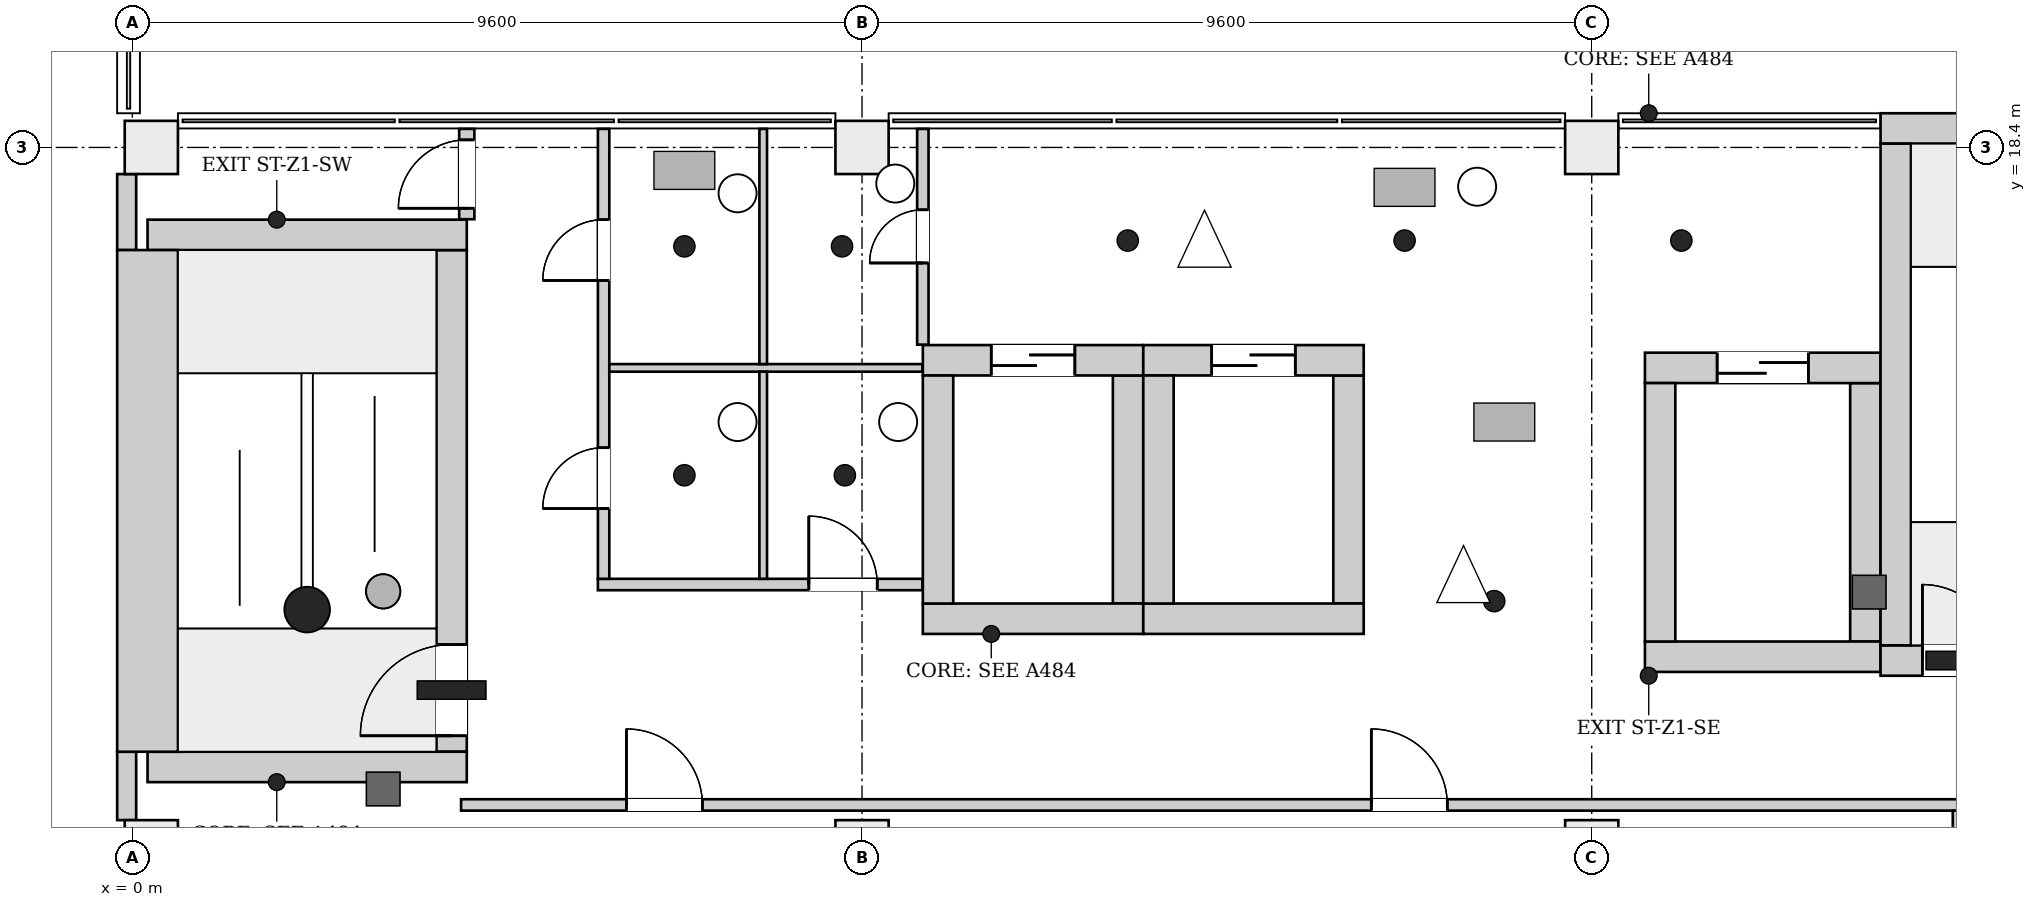
"""IFC4 building model, lengths in metres.
Left out: names, types, materials, properties, quantities, classifications, styles, units other than length and angle.
Written with IfcOpenShell. Run it as: python <this file> out.ifc"""

import sys

from ifc_helpers import new_model, si_unit, direction, frame, frame_2d, origin, origin_2d, place, context, subcontext, project, spatial, rectangle, extrude, element, fill, save


model = new_model("IFC4")
c1 = context("Model", 3, precision=1e-05, world=origin(), true_north=direction((0.0, 1.0)))
c2 = subcontext(c1, "Body", "Model", "MODEL_VIEW")
j1 = project(units=[si_unit("LENGTHUNIT", "METRE"), si_unit("PLANEANGLEUNIT", "RADIAN")], contexts=[c1])
p1 = place(None, origin())
s1 = spatial("IfcSite", under=j1, at=p1, CompositionType="ELEMENT")
p2 = place(p1, origin())
s2 = spatial("IfcBuilding", under=s1, at=p2, CompositionType="ELEMENT")
p3 = place(p2, frame((0.0, 0.0, 69.7)))
s3 = spatial("IfcBuildingStorey", under=s2, at=p3, CompositionType="ELEMENT", Elevation=69.7)
for number, where, z_axis, x_axis in (
    (1, (0.2, 10.25, 0.0), (0.0, 0.0, 1.0), (1.0, 0.0, 0.0)),
    (2, (0.2, 17.25, 0.0), (0.0, 0.0, 1.0), (1.0, 0.0, 0.0)),
):
    element("IfcWall", number, at=place(p3, frame(where, z_axis=z_axis, x_axis=x_axis)), inside=s3, PredefinedType="SHEAR", context=c2, shape_type="SweptSolid", body=[
        extrude(rectangle(XDim=4.2, YDim=0.4, at=frame_2d((2.1, 0.0))), origin(), (0.0, 0.0, 1.0), 4.2),
    ])
p4 = place(p3, frame((0.2, 10.45, 0.0), z_axis=(0.0, 0.0, 1.0), x_axis=(0.0, 1.0, 0.0)))
e3 = element("IfcWall", 3, at=p4, inside=s3, PredefinedType="SHEAR", context=c2, shape_type="SweptSolid", body=[
    extrude(rectangle(XDim=6.6, YDim=0.8, at=frame_2d((3.3, 0.0))), origin(), (0.0, 0.0, 1.0), 4.2),
])
p5 = place(p3, frame((4.2, 10.45, 0.0), z_axis=(0.0, 0.0, 1.0), x_axis=(0.0, 1.0, 0.0)))
e4 = element("IfcWall", 4, at=p5, inside=s3, PredefinedType="SHEAR", context=c2, shape_type="SweptSolid", body=[
    extrude(rectangle(XDim=6.6, YDim=0.4, at=frame_2d((3.3, 0.0))), origin(), (0.0, 0.0, 1.0), 4.2),
])
p6 = place(p5, frame((0.21, 0.0, 0.0)))
e5 = element("IfcOpeningElement", 5, at=p6, cuts=e4, PredefinedType="OPENING", context=c2, shape_type="SweptSolid", body=[
    extrude(rectangle(XDim=1.2, YDim=2.1, at=frame_2d((0.6, 1.05))), frame((0.0, 0.21, 0.0), z_axis=(0.0, -1.0, 0.0), x_axis=(1.0, 0.0, 0.0)), (0.0, 0.0, 1.0), 0.42),
])
p7 = place(p3, frame((23.0, 11.65, 0.0), z_axis=(0.0, 0.0, 1.0), x_axis=(1.0, 0.0, 0.0)))
e6 = element("IfcWall", 6, at=p7, inside=s3, PredefinedType="SHEAR", context=c2, shape_type="SweptSolid", body=[
    extrude(rectangle(XDim=4.2, YDim=0.4, at=frame_2d((2.1, 0.0))), origin(), (0.0, 0.0, 1.0), 4.2),
])
p8 = place(p7, frame((0.55, 0.0, 0.0)))
e7 = element("IfcOpeningElement", 7, at=p8, cuts=e6, PredefinedType="OPENING", context=c2, shape_type="SweptSolid", body=[
    extrude(rectangle(XDim=1.0, YDim=2.1, at=frame_2d((0.5, 1.05))), frame((0.0, 0.21, 0.0), z_axis=(0.0, -1.0, 0.0), x_axis=(1.0, 0.0, 0.0)), (0.0, 0.0, 1.0), 0.42),
])
p9 = place(p7, frame((2.65, 0.0, 0.0)))
e8 = element("IfcOpeningElement", 8, at=p9, cuts=e6, PredefinedType="OPENING", context=c2, shape_type="SweptSolid", body=[
    extrude(rectangle(XDim=1.0, YDim=2.1, at=frame_2d((0.5, 1.05))), frame((0.0, 0.21, 0.0), z_axis=(0.0, -1.0, 0.0), x_axis=(1.0, 0.0, 0.0)), (0.0, 0.0, 1.0), 0.42),
])
p10 = place(p3, frame((23.0, 18.65, 0.0), z_axis=(0.0, 0.0, 1.0), x_axis=(1.0, 0.0, 0.0)))
e9 = element("IfcWall", 9, at=p10, inside=s3, PredefinedType="SHEAR", context=c2, shape_type="SweptSolid", body=[
    extrude(rectangle(XDim=4.2, YDim=0.4, at=frame_2d((2.1, 0.0))), origin(), (0.0, 0.0, 1.0), 4.2),
])
p11 = place(p3, frame((23.2, 11.85, 0.0), z_axis=(0.0, 0.0, 1.0), x_axis=(0.0, 1.0, 0.0)))
e10 = element("IfcWall", 10, at=p11, inside=s3, PredefinedType="SHEAR", context=c2, shape_type="SweptSolid", body=[
    extrude(rectangle(XDim=6.6, YDim=0.4, at=frame_2d((3.3, 0.0))), origin(), (0.0, 0.0, 1.0), 4.2),
])
p12 = place(p3, frame((10.4, 12.2, 0.0), z_axis=(0.0, 0.0, 1.0), x_axis=(1.0, 0.0, 0.0)))
e11 = element("IfcWall", 11, at=p12, inside=s3, PredefinedType="SHEAR", context=c2, shape_type="SweptSolid", body=[
    extrude(rectangle(XDim=2.9, YDim=0.4, at=frame_2d((1.45, 0.0))), origin(), (0.0, 0.0, 1.0), 4.2),
])
p13 = place(p3, frame((10.4, 15.6, 0.0), z_axis=(0.0, 0.0, 1.0), x_axis=(1.0, 0.0, 0.0)))
e12 = element("IfcWall", 12, at=p13, inside=s3, PredefinedType="SHEAR", context=c2, shape_type="SweptSolid", body=[
    extrude(rectangle(XDim=2.9, YDim=0.4, at=frame_2d((1.45, 0.0))), origin(), (0.0, 0.0, 1.0), 4.2),
])
p14 = place(p13, frame((0.9, 0.0, 0.0)))
e13 = element("IfcOpeningElement", 13, at=p14, cuts=e12, PredefinedType="OPENING", context=c2, shape_type="SweptSolid", body=[
    extrude(rectangle(XDim=1.1, YDim=2.1, at=frame_2d((0.55, 1.05))), frame((0.0, 0.21, 0.0), z_axis=(0.0, -1.0, 0.0), x_axis=(1.0, 0.0, 0.0)), (0.0, 0.0, 1.0), 0.42),
])
for number, where, z_axis, x_axis in (
    (14, (10.6, 12.4, 0.0), (0.0, 0.0, 1.0), (0.0, 1.0, 0.0)),
    (15, (13.1, 12.4, 0.0), (0.0, 0.0, 1.0), (0.0, 1.0, 0.0)),
):
    element("IfcWall", number, at=place(p3, frame(where, z_axis=z_axis, x_axis=x_axis)), inside=s3, PredefinedType="SHEAR", context=c2, shape_type="SweptSolid", body=[
        extrude(rectangle(XDim=3.0, YDim=0.4, at=frame_2d((1.5, 0.0))), origin(), (0.0, 0.0, 1.0), 4.2),
    ])
p15 = place(p3, frame((13.3, 12.2, 0.0), z_axis=(0.0, 0.0, 1.0), x_axis=(1.0, 0.0, 0.0)))
e16 = element("IfcWall", 16, at=p15, inside=s3, PredefinedType="SHEAR", context=c2, shape_type="SweptSolid", body=[
    extrude(rectangle(XDim=2.9, YDim=0.4, at=frame_2d((1.45, 0.0))), origin(), (0.0, 0.0, 1.0), 4.2),
])
p16 = place(p3, frame((13.3, 15.6, 0.0), z_axis=(0.0, 0.0, 1.0), x_axis=(1.0, 0.0, 0.0)))
e17 = element("IfcWall", 17, at=p16, inside=s3, PredefinedType="SHEAR", context=c2, shape_type="SweptSolid", body=[
    extrude(rectangle(XDim=2.9, YDim=0.4, at=frame_2d((1.45, 0.0))), origin(), (0.0, 0.0, 1.0), 4.2),
])
p17 = place(p16, frame((0.9, 0.0, 0.0)))
e18 = element("IfcOpeningElement", 18, at=p17, cuts=e17, PredefinedType="OPENING", context=c2, shape_type="SweptSolid", body=[
    extrude(rectangle(XDim=1.1, YDim=2.1, at=frame_2d((0.55, 1.05))), frame((0.0, 0.21, 0.0), z_axis=(0.0, -1.0, 0.0), x_axis=(1.0, 0.0, 0.0)), (0.0, 0.0, 1.0), 0.42),
])
for number, where, z_axis, x_axis in (
    (19, (13.5, 12.4, 0.0), (0.0, 0.0, 1.0), (0.0, 1.0, 0.0)),
    (20, (16.0, 12.4, 0.0), (0.0, 0.0, 1.0), (0.0, 1.0, 0.0)),
):
    element("IfcWall", number, at=place(p3, frame(where, z_axis=z_axis, x_axis=x_axis)), inside=s3, PredefinedType="SHEAR", context=c2, shape_type="SweptSolid", body=[
        extrude(rectangle(XDim=3.0, YDim=0.4, at=frame_2d((1.5, 0.0))), origin(), (0.0, 0.0, 1.0), 4.2),
    ])
p18 = place(p3, frame((19.9, 11.7, 0.0), z_axis=(0.0, 0.0, 1.0), x_axis=(1.0, 0.0, 0.0)))
e21 = element("IfcWall", 21, at=p18, inside=s3, PredefinedType="SHEAR", context=c2, shape_type="SweptSolid", body=[
    extrude(rectangle(XDim=3.1, YDim=0.4, at=frame_2d((1.55, 0.0))), origin(), (0.0, 0.0, 1.0), 4.2),
])
p19 = place(p3, frame((19.9, 15.5, 0.0), z_axis=(0.0, 0.0, 1.0), x_axis=(1.0, 0.0, 0.0)))
e22 = element("IfcWall", 22, at=p19, inside=s3, PredefinedType="SHEAR", context=c2, shape_type="SweptSolid", body=[
    extrude(rectangle(XDim=3.1, YDim=0.4, at=frame_2d((1.55, 0.0))), origin(), (0.0, 0.0, 1.0), 4.2),
])
p20 = place(p19, frame((0.95, 0.0, 0.0)))
e23 = element("IfcOpeningElement", 23, at=p20, cuts=e22, PredefinedType="OPENING", context=c2, shape_type="SweptSolid", body=[
    extrude(rectangle(XDim=1.2, YDim=2.1, at=frame_2d((0.6, 1.05))), frame((0.0, 0.21, 0.0), z_axis=(0.0, -1.0, 0.0), x_axis=(1.0, 0.0, 0.0)), (0.0, 0.0, 1.0), 0.42),
])
for number, where, z_axis, x_axis in (
    (24, (20.1, 11.9, 0.0), (0.0, 0.0, 1.0), (0.0, 1.0, 0.0)),
    (25, (22.8, 11.9, 0.0), (0.0, 0.0, 1.0), (0.0, 1.0, 0.0)),
):
    element("IfcWall", number, at=place(p3, frame(where, z_axis=z_axis, x_axis=x_axis)), inside=s3, PredefinedType="SHEAR", context=c2, shape_type="SweptSolid", body=[
        extrude(rectangle(XDim=3.4, YDim=0.4, at=frame_2d((1.7, 0.0))), origin(), (0.0, 0.0, 1.0), 4.2),
    ])
for number, where, z_axis, x_axis in (
    (26, (0.25, 9.2, 0.0), (0.0, 0.0, 1.0), (1.0, 0.0, 0.0)),
    (27, (9.6, 9.2, 0.0), (0.0, 0.0, 1.0), (1.0, 0.0, 0.0)),
    (28, (19.2, 9.2, 0.0), (0.0, 0.0, 1.0), (1.0, 0.0, 0.0)),
    (29, (0.25, 18.4, 0.0), (0.0, 0.0, 1.0), (1.0, 0.0, 0.0)),
    (30, (9.6, 18.4, 0.0), (0.0, 0.0, 1.0), (1.0, 0.0, 0.0)),
    (31, (19.2, 18.4, 0.0), (0.0, 0.0, 1.0), (1.0, 0.0, 0.0)),
):
    element("IfcColumn", number, at=place(p3, frame(where, z_axis=z_axis, x_axis=x_axis)), inside=s3, PredefinedType="COLUMN", context=c2, shape_type="SweptSolid", body=[
        extrude(rectangle(XDim=0.7, YDim=0.7, at=origin_2d()), origin(), (0.0, 0.0, 1.0), 4.2),
    ])
p21 = place(p3, frame((-0.074, 10.45, 0.0), z_axis=(0.0, 0.0, 1.0), x_axis=(0.0, -1.0, 0.0)))
e32 = element("IfcWall", 32, at=p21, inside=s3, PredefinedType="ELEMENTEDWALL", context=c2, shape_type="SweptSolid", body=[
    extrude(rectangle(XDim=0.9, YDim=0.25, at=frame_2d((0.45, 0.0))), origin(), (0.0, 0.0, 1.0), 3.9),
])
p22 = place(p3, frame((-0.074, 18.05, 0.0), z_axis=(0.0, 0.0, 1.0), x_axis=(0.0, -1.0, 0.0)))
e33 = element("IfcWall", 33, at=p22, inside=s3, PredefinedType="ELEMENTEDWALL", context=c2, shape_type="SweptSolid", body=[
    extrude(rectangle(XDim=1.0, YDim=0.25, at=frame_2d((0.5, 0.0))), origin(), (0.0, 0.0, 1.0), 3.9),
])
p23 = place(p3, frame((4.4, 17.456, 0.0), z_axis=(0.0, 0.0, 1.0), x_axis=(0.0, 1.0, 0.0)))
e34 = element("IfcWall", 34, at=p23, inside=s3, PredefinedType="PARTITIONING", context=c2, shape_type="SweptSolid", body=[
    extrude(rectangle(XDim=1.188, YDim=0.2, at=frame_2d((0.594, 0.0))), origin(), (0.0, 0.0, 1.0), 3.9),
])
p24 = place(p23, frame((0.144, 0.0, 0.0)))
e35 = element("IfcOpeningElement", 35, at=p24, cuts=e34, PredefinedType="OPENING", context=c2, shape_type="SweptSolid", body=[
    extrude(rectangle(XDim=0.9, YDim=2.1, at=frame_2d((0.45, 1.05))), frame((0.0, 0.11, 0.0), z_axis=(0.0, -1.0, 0.0), x_axis=(1.0, 0.0, 0.0)), (0.0, 0.0, 1.0), 0.22),
])
p25 = place(p3, frame((4.325, 9.75, 0.0), z_axis=(0.0, 0.0, 1.0), x_axis=(1.0, 0.0, 0.0)))
e36 = element("IfcWall", 36, at=p25, inside=s3, PredefinedType="PARTITIONING", context=c2, shape_type="SweptSolid", body=[
    extrude(rectangle(XDim=34.369, YDim=0.15, at=frame_2d((17.185, 0.0))), origin(), (0.0, 0.0, 1.0), 3.9),
])
p26 = place(p25, frame((2.175, 0.0, 0.0)))
e37 = element("IfcOpeningElement", 37, at=p26, cuts=e36, PredefinedType="OPENING", context=c2, shape_type="SweptSolid", body=[
    extrude(rectangle(XDim=1.0, YDim=2.1, at=frame_2d((0.5, 1.05))), frame((0.0, 0.085, 0.0), z_axis=(0.0, -1.0, 0.0), x_axis=(1.0, 0.0, 0.0)), (0.0, 0.0, 1.0), 0.17),
])
p27 = place(p25, frame((11.975, 0.0, 0.0)))
e38 = element("IfcOpeningElement", 38, at=p27, cuts=e36, PredefinedType="OPENING", context=c2, shape_type="SweptSolid", body=[
    extrude(rectangle(XDim=1.0, YDim=2.1, at=frame_2d((0.5, 1.05))), frame((0.0, 0.085, 0.0), z_axis=(0.0, -1.0, 0.0), x_axis=(1.0, 0.0, 0.0)), (0.0, 0.0, 1.0), 0.17),
])
p28 = place(p25, frame((21.575, 0.0, 0.0)))
e39 = element("IfcOpeningElement", 39, at=p28, cuts=e36, PredefinedType="OPENING", context=c2, shape_type="SweptSolid", body=[
    extrude(rectangle(XDim=1.0, YDim=2.1, at=frame_2d((0.5, 1.05))), frame((0.0, 0.085, 0.0), z_axis=(0.0, -1.0, 0.0), x_axis=(1.0, 0.0, 0.0)), (0.0, 0.0, 1.0), 0.17),
])
p29 = place(p25, frame((28.925, 0.0, 0.0)))
e40 = element("IfcOpeningElement", 40, at=p29, cuts=e36, PredefinedType="OPENING", context=c2, shape_type="SweptSolid", body=[
    extrude(rectangle(XDim=1.0, YDim=2.1, at=frame_2d((0.5, 1.05))), frame((0.0, 0.085, 0.0), z_axis=(0.0, -1.0, 0.0), x_axis=(1.0, 0.0, 0.0)), (0.0, 0.0, 1.0), 0.17),
])
p30 = place(p3, frame((6.125, 12.65, 0.0), z_axis=(0.0, 0.0, 1.0), x_axis=(1.0, 0.0, 0.0)))
e41 = element("IfcWall", 41, at=p30, inside=s3, PredefinedType="PARTITIONING", context=c2, shape_type="SweptSolid", body=[
    extrude(rectangle(XDim=4.269, YDim=0.15, at=frame_2d((2.135, 0.0))), origin(), (0.0, 0.0, 1.0), 3.9),
])
p31 = place(p30, frame((2.775, 0.0, 0.0)))
e42 = element("IfcOpeningElement", 42, at=p31, cuts=e41, PredefinedType="OPENING", context=c2, shape_type="SweptSolid", body=[
    extrude(rectangle(XDim=0.9, YDim=2.1, at=frame_2d((0.45, 1.05))), frame((0.0, 0.085, 0.0), z_axis=(0.0, -1.0, 0.0), x_axis=(1.0, 0.0, 0.0)), (0.0, 0.0, 1.0), 0.17),
])
p32 = place(p3, frame((6.2, 12.725, 0.0), z_axis=(0.0, 0.0, 1.0), x_axis=(0.0, 1.0, 0.0)))
e43 = element("IfcWall", 43, at=p32, inside=s3, PredefinedType="PARTITIONING", context=c2, shape_type="SweptSolid", body=[
    extrude(rectangle(XDim=5.919, YDim=0.15, at=frame_2d((2.959, 0.0))), origin(), (0.0, 0.0, 1.0), 3.9),
])
p33 = place(p32, frame((0.925, 0.0, 0.0)))
e44 = element("IfcOpeningElement", 44, at=p33, cuts=e43, PredefinedType="OPENING", context=c2, shape_type="SweptSolid", body=[
    extrude(rectangle(XDim=0.8, YDim=2.1, at=frame_2d((0.4, 1.05))), frame((0.0, 0.085, 0.0), z_axis=(0.0, -1.0, 0.0), x_axis=(1.0, 0.0, 0.0)), (0.0, 0.0, 1.0), 0.17),
])
p34 = place(p32, frame((3.925, 0.0, 0.0)))
e45 = element("IfcOpeningElement", 45, at=p34, cuts=e43, PredefinedType="OPENING", context=c2, shape_type="SweptSolid", body=[
    extrude(rectangle(XDim=0.8, YDim=2.1, at=frame_2d((0.4, 1.05))), frame((0.0, 0.085, 0.0), z_axis=(0.0, -1.0, 0.0), x_axis=(1.0, 0.0, 0.0)), (0.0, 0.0, 1.0), 0.17),
])
p35 = place(p3, frame((6.275, 15.5, 0.0), z_axis=(0.0, 0.0, 1.0), x_axis=(1.0, 0.0, 0.0)))
e46 = element("IfcWall", 46, at=p35, inside=s3, PredefinedType="PARTITIONING", context=c2, shape_type="SweptSolid", body=[
    extrude(rectangle(XDim=4.119, YDim=0.1, at=frame_2d((2.06, 0.0))), origin(), (0.0, 0.0, 1.0), 3.9),
])
p36 = place(p3, frame((8.3, 12.725, 0.0), z_axis=(0.0, 0.0, 1.0), x_axis=(0.0, 1.0, 0.0)))
e47 = element("IfcWall", 47, at=p36, inside=s3, PredefinedType="PARTITIONING", context=c2, shape_type="SweptSolid", body=[
    extrude(rectangle(XDim=2.725, YDim=0.1, at=frame_2d((1.362, 0.0))), origin(), (0.0, 0.0, 1.0), 3.9),
])
p37 = place(p3, frame((8.3, 15.55, 0.0), z_axis=(0.0, 0.0, 1.0), x_axis=(0.0, 1.0, 0.0)))
e48 = element("IfcWall", 48, at=p37, inside=s3, PredefinedType="PARTITIONING", context=c2, shape_type="SweptSolid", body=[
    extrude(rectangle(XDim=3.094, YDim=0.1, at=frame_2d((1.547, 0.0))), origin(), (0.0, 0.0, 1.0), 3.9),
])
p38 = place(p3, frame((10.4, 15.806, 0.0), z_axis=(0.0, 0.0, 1.0), x_axis=(0.0, 1.0, 0.0)))
e49 = element("IfcWall", 49, at=p38, inside=s3, PredefinedType="PARTITIONING", context=c2, shape_type="SweptSolid", body=[
    extrude(rectangle(XDim=2.838, YDim=0.15, at=frame_2d((1.419, 0.0))), origin(), (0.0, 0.0, 1.0), 3.9),
])
p39 = place(p38, frame((1.074, 0.0, 0.0)))
e50 = element("IfcOpeningElement", 50, at=p39, cuts=e49, PredefinedType="OPENING", context=c2, shape_type="SweptSolid", body=[
    extrude(rectangle(XDim=0.7, YDim=2.1, at=frame_2d((0.35, 1.05))), frame((0.0, 0.085, 0.0), z_axis=(0.0, -1.0, 0.0), x_axis=(1.0, 0.0, 0.0)), (0.0, 0.0, 1.0), 0.17),
])
p40 = place(p3, frame((24.0, 0.006, 0.0), z_axis=(0.0, 0.0, 1.0), x_axis=(0.0, 1.0, 0.0)))
e51 = element("IfcWall", 51, at=p40, inside=s3, PredefinedType="PARTITIONING", context=c2, shape_type="SweptSolid", body=[
    extrude(rectangle(XDim=9.669, YDim=0.1, at=frame_2d((4.834, 0.0))), origin(), (0.0, 0.0, 1.0), 3.9),
])
p41 = place(p6, origin())
e52 = element("IfcDoor", 52, at=p41, inside=s3, OperationType="SINGLE_SWING_RIGHT", PredefinedType="DOOR", context=c2, shape_type="SweptSolid", body=[
    extrude(rectangle(XDim=1.2, YDim=2.1, at=frame_2d((0.6, 1.05))), frame((0.0, 0.025, 0.0), z_axis=(0.0, -1.0, 0.0), x_axis=(1.0, 0.0, 0.0)), (0.0, 0.0, 1.0), 0.05),
])
fill(e5, e52)
p42 = place(p8, origin())
e53 = element("IfcDoor", 53, at=p42, inside=s3, OperationType="SINGLE_SWING_RIGHT", PredefinedType="DOOR", context=c2, shape_type="SweptSolid", body=[
    extrude(rectangle(XDim=1.0, YDim=2.1, at=frame_2d((0.5, 1.05))), frame((0.0, 0.025, 0.0), z_axis=(0.0, -1.0, 0.0), x_axis=(1.0, 0.0, 0.0)), (0.0, 0.0, 1.0), 0.05),
])
fill(e7, e53)
p43 = place(p14, origin())
e54 = element("IfcDoor", 54, at=p43, inside=s3, OperationType="DOUBLE_DOOR_SLIDING", PredefinedType="DOOR", context=c2, shape_type="SweptSolid", body=[
    extrude(rectangle(XDim=1.1, YDim=2.1, at=frame_2d((0.55, 1.05))), frame((0.0, 0.025, 0.0), z_axis=(0.0, -1.0, 0.0), x_axis=(1.0, 0.0, 0.0)), (0.0, 0.0, 1.0), 0.05),
])
fill(e13, e54)
p44 = place(p17, origin())
e55 = element("IfcDoor", 55, at=p44, inside=s3, OperationType="DOUBLE_DOOR_SLIDING", PredefinedType="DOOR", context=c2, shape_type="SweptSolid", body=[
    extrude(rectangle(XDim=1.1, YDim=2.1, at=frame_2d((0.55, 1.05))), frame((0.0, 0.025, 0.0), z_axis=(0.0, -1.0, 0.0), x_axis=(1.0, 0.0, 0.0)), (0.0, 0.0, 1.0), 0.05),
])
fill(e18, e55)
p45 = place(p20, origin())
e56 = element("IfcDoor", 56, at=p45, inside=s3, OperationType="DOUBLE_DOOR_SLIDING", PredefinedType="DOOR", context=c2, shape_type="SweptSolid", body=[
    extrude(rectangle(XDim=1.2, YDim=2.1, at=frame_2d((0.6, 1.05))), frame((0.0, 0.025, 0.0), z_axis=(0.0, -1.0, 0.0), x_axis=(1.0, 0.0, 0.0)), (0.0, 0.0, 1.0), 0.05),
])
fill(e23, e56)
p46 = place(p24, origin())
e57 = element("IfcDoor", 57, at=p46, inside=s3, OperationType="SINGLE_SWING_LEFT", PredefinedType="DOOR", context=c2, shape_type="SweptSolid", body=[
    extrude(rectangle(XDim=0.9, YDim=2.1, at=frame_2d((0.45, 1.05))), frame((0.0, 0.025, 0.0), z_axis=(0.0, -1.0, 0.0), x_axis=(1.0, 0.0, 0.0)), (0.0, 0.0, 1.0), 0.05),
])
fill(e35, e57)
p47 = place(p33, origin())
e58 = element("IfcDoor", 58, at=p47, inside=s3, OperationType="SINGLE_SWING_LEFT", PredefinedType="DOOR", context=c2, shape_type="SweptSolid", body=[
    extrude(rectangle(XDim=0.8, YDim=2.1, at=frame_2d((0.4, 1.05))), frame((0.0, 0.025, 0.0), z_axis=(0.0, -1.0, 0.0), x_axis=(1.0, 0.0, 0.0)), (0.0, 0.0, 1.0), 0.05),
])
fill(e44, e58)
p48 = place(p31, origin())
e59 = element("IfcDoor", 59, at=p48, inside=s3, OperationType="SINGLE_SWING_RIGHT", PredefinedType="DOOR", context=c2, shape_type="SweptSolid", body=[
    extrude(rectangle(XDim=0.9, YDim=2.1, at=frame_2d((0.45, 1.05))), frame((0.0, 0.025, 0.0), z_axis=(0.0, -1.0, 0.0), x_axis=(1.0, 0.0, 0.0)), (0.0, 0.0, 1.0), 0.05),
])
fill(e42, e59)
p49 = place(p34, origin())
e60 = element("IfcDoor", 60, at=p49, inside=s3, OperationType="SINGLE_SWING_LEFT", PredefinedType="DOOR", context=c2, shape_type="SweptSolid", body=[
    extrude(rectangle(XDim=0.8, YDim=2.1, at=frame_2d((0.4, 1.05))), frame((0.0, 0.025, 0.0), z_axis=(0.0, -1.0, 0.0), x_axis=(1.0, 0.0, 0.0)), (0.0, 0.0, 1.0), 0.05),
])
fill(e45, e60)
p50 = place(p39, origin())
e61 = element("IfcDoor", 61, at=p50, inside=s3, OperationType="SINGLE_SWING_LEFT", PredefinedType="DOOR", context=c2, shape_type="SweptSolid", body=[
    extrude(rectangle(XDim=0.7, YDim=2.1, at=frame_2d((0.35, 1.05))), frame((0.0, 0.025, 0.0), z_axis=(0.0, -1.0, 0.0), x_axis=(1.0, 0.0, 0.0)), (0.0, 0.0, 1.0), 0.05),
])
fill(e50, e61)
p51 = place(p26, origin())
e62 = element("IfcDoor", 62, at=p51, inside=s3, OperationType="SINGLE_SWING_RIGHT", PredefinedType="DOOR", context=c2, shape_type="SweptSolid", body=[
    extrude(rectangle(XDim=1.0, YDim=2.1, at=frame_2d((0.5, 1.05))), frame((0.0, 0.025, 0.0), z_axis=(0.0, -1.0, 0.0), x_axis=(1.0, 0.0, 0.0)), (0.0, 0.0, 1.0), 0.05),
])
fill(e37, e62)
p52 = place(p27, origin())
e63 = element("IfcDoor", 63, at=p52, inside=s3, OperationType="SINGLE_SWING_RIGHT", PredefinedType="DOOR", context=c2, shape_type="SweptSolid", body=[
    extrude(rectangle(XDim=1.0, YDim=2.1, at=frame_2d((0.5, 1.05))), frame((0.0, 0.025, 0.0), z_axis=(0.0, -1.0, 0.0), x_axis=(1.0, 0.0, 0.0)), (0.0, 0.0, 1.0), 0.05),
])
fill(e38, e63)
save(model, sys.argv[1])
